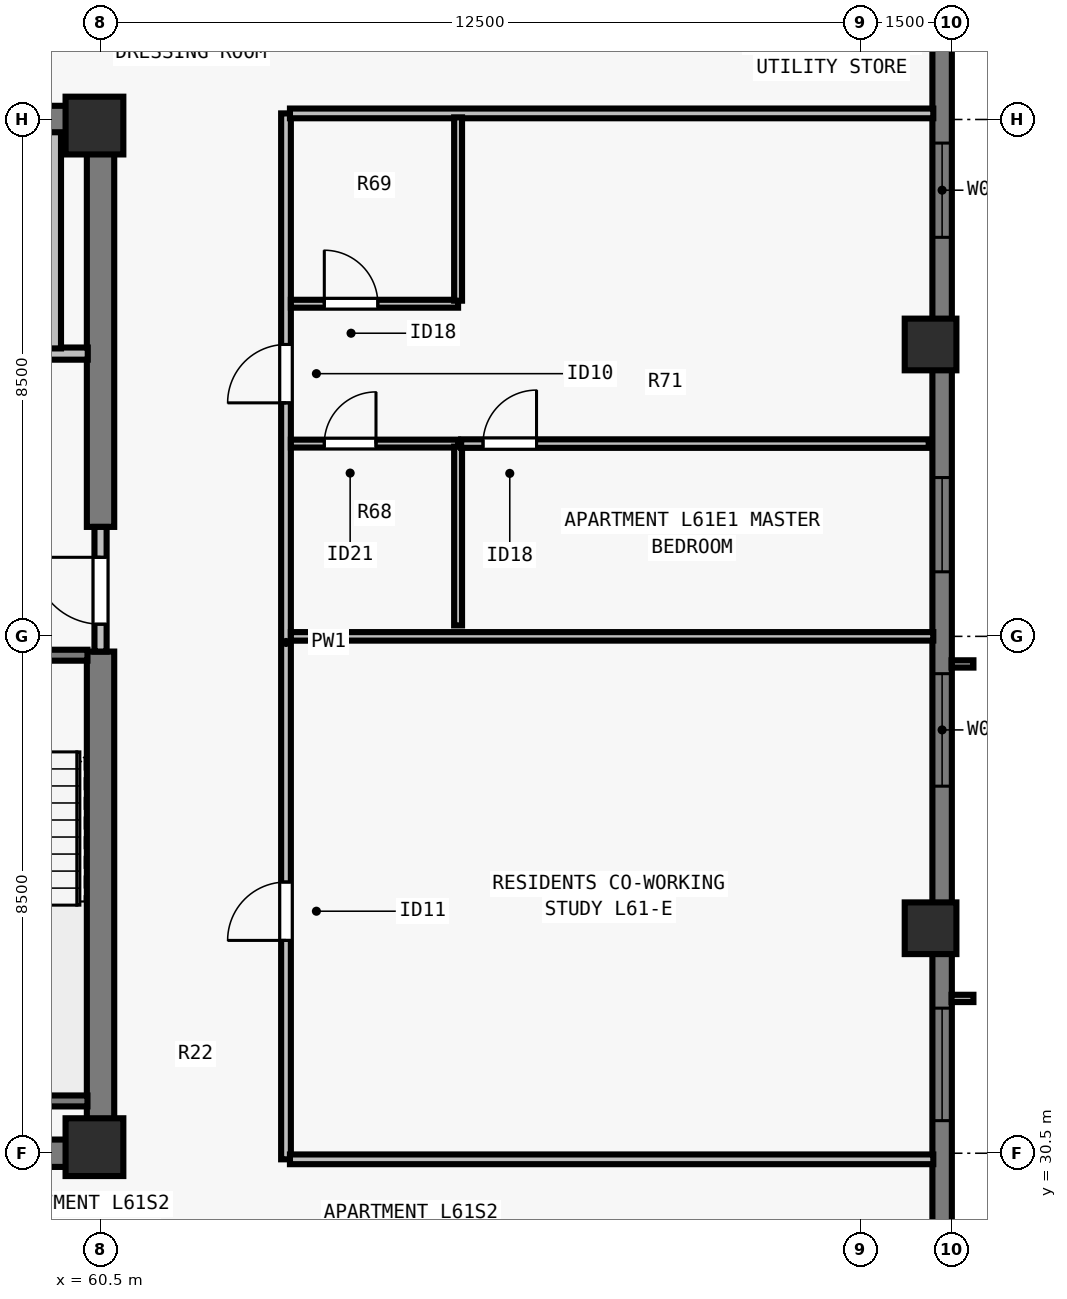
"""IFC4 building model, lengths in metres.
Left out: names, types, materials, properties, quantities, classifications, styles, units other than length and angle.
Written with IfcOpenShell. Run it as: python <this file> out.ifc"""

import sys

from ifc_helpers import new_model, si_unit, direction, frame, frame_2d, origin, origin_2d, place, context, subcontext, project, spatial, rectangle, extrude, element, fill, save


model = new_model("IFC4")
c1 = context("Model", 3, precision=1e-05, world=origin(), true_north=direction((0.0, 1.0)))
c2 = subcontext(c1, "Body", "Model", "MODEL_VIEW")
j1 = project(units=[si_unit("LENGTHUNIT", "METRE"), si_unit("PLANEANGLEUNIT", "RADIAN")], contexts=[c1])
p1 = place(None, origin())
s1 = spatial("IfcSite", under=j1, at=p1, CompositionType="ELEMENT")
p2 = place(p1, origin())
s2 = spatial("IfcBuilding", under=s1, at=p2, CompositionType="ELEMENT")
p3 = place(p2, frame((0.0, 0.0, 223.5)))
s3 = spatial("IfcBuildingStorey", under=s2, at=p3, CompositionType="ELEMENT", Elevation=223.5)
for number, where, z_axis, x_axis in (
    (1, (60.4, 30.6, 0.0), (0.0, 0.0, 1.0), (1.0, 0.0, 0.0)),
    (2, (60.4, 47.4, 0.0), (0.0, 0.0, 1.0), (1.0, 0.0, 0.0)),
):
    element("IfcColumn", number, at=place(p3, frame(where, z_axis=z_axis, x_axis=x_axis)), inside=s3, PredefinedType="COLUMN", context=c2, shape_type="SweptSolid", body=[
        extrude(rectangle(XDim=0.95, YDim=0.95, at=origin_2d()), origin(), (0.0, 0.0, 1.0), 3.5),
    ])
for number, where, z_axis, x_axis in (
    (3, (74.15, 34.2, 0.0), (0.0, 0.0, 1.0), (0.0, 1.0, 0.0)),
    (4, (74.15, 43.8, 0.0), (0.0, 0.0, 1.0), (0.0, 1.0, 0.0)),
):
    element("IfcColumn", number, at=place(p3, frame(where, z_axis=z_axis, x_axis=x_axis)), inside=s3, PredefinedType="COLUMN", context=c2, shape_type="SweptSolid", body=[
        extrude(rectangle(XDim=0.85, YDim=0.85, at=origin_2d()), origin(), (0.0, 0.0, 1.0), 3.5),
    ])
p4 = place(p3, frame((74.34, 56.5, 0.0), z_axis=(0.0, 0.0, 1.0), x_axis=(0.0, -1.0, 0.0)))
e5 = element("IfcWall", 5, at=p4, inside=s3, PredefinedType="SOLIDWALL", context=c2, shape_type="SweptSolid", body=[
    extrude(rectangle(XDim=34.702, YDim=0.32, at=frame_2d((17.351, 0.0))), origin(), (0.0, 0.0, 1.0), 3.29),
])
p5 = place(p4, frame((4.613, 0.0, 0.8)))
e6 = element("IfcOpeningElement", 6, at=p5, cuts=e5, PredefinedType="OPENING", context=c2, shape_type="SweptSolid", body=[
    extrude(rectangle(XDim=1.85, YDim=1.678, at=frame_2d((0.925, 0.839))), frame((0.0, 0.17, 0.0), z_axis=(0.0, -1.0, 0.0), x_axis=(1.0, 0.0, 0.0)), (0.0, 0.0, 1.0), 0.34),
])
p6 = place(p4, frame((9.388, 0.0, 0.8)))
e7 = element("IfcOpeningElement", 7, at=p6, cuts=e5, PredefinedType="OPENING", context=c2, shape_type="SweptSolid", body=[
    extrude(rectangle(XDim=1.55, YDim=1.678, at=frame_2d((0.775, 0.839))), frame((0.0, 0.17, 0.0), z_axis=(0.0, -1.0, 0.0), x_axis=(1.0, 0.0, 0.0)), (0.0, 0.0, 1.0), 0.34),
])
p7 = place(p4, frame((14.888, 0.0, 0.8)))
e8 = element("IfcOpeningElement", 8, at=p7, cuts=e5, PredefinedType="OPENING", context=c2, shape_type="SweptSolid", body=[
    extrude(rectangle(XDim=1.55, YDim=1.678, at=frame_2d((0.775, 0.839))), frame((0.0, 0.17, 0.0), z_axis=(0.0, -1.0, 0.0), x_axis=(1.0, 0.0, 0.0)), (0.0, 0.0, 1.0), 0.34),
])
p8 = place(p4, frame((18.114, 0.0, 0.8)))
e9 = element("IfcOpeningElement", 9, at=p8, cuts=e5, PredefinedType="OPENING", context=c2, shape_type="SweptSolid", body=[
    extrude(rectangle(XDim=1.85, YDim=1.678, at=frame_2d((0.925, 0.839))), frame((0.0, 0.17, 0.0), z_axis=(0.0, -1.0, 0.0), x_axis=(1.0, 0.0, 0.0)), (0.0, 0.0, 1.0), 0.34),
])
p9 = place(p4, frame((23.614, 0.0, 0.8)))
e10 = element("IfcOpeningElement", 10, at=p9, cuts=e5, PredefinedType="OPENING", context=c2, shape_type="SweptSolid", body=[
    extrude(rectangle(XDim=1.85, YDim=1.678, at=frame_2d((0.925, 0.839))), frame((0.0, 0.17, 0.0), z_axis=(0.0, -1.0, 0.0), x_axis=(1.0, 0.0, 0.0)), (0.0, 0.0, 1.0), 0.34),
])
p10 = place(p4, frame((28.839, 0.0, 0.8)))
e11 = element("IfcOpeningElement", 11, at=p10, cuts=e5, PredefinedType="OPENING", context=c2, shape_type="SweptSolid", body=[
    extrude(rectangle(XDim=1.55, YDim=1.678, at=frame_2d((0.775, 0.839))), frame((0.0, 0.17, 0.0), z_axis=(0.0, -1.0, 0.0), x_axis=(1.0, 0.0, 0.0)), (0.0, 0.0, 1.0), 0.34),
])
p11 = place(p4, frame((31.35, 0.0, 0.8)))
e12 = element("IfcOpeningElement", 12, at=p11, cuts=e5, PredefinedType="OPENING", context=c2, shape_type="SweptSolid", body=[
    extrude(rectangle(XDim=0.9, YDim=1.678, at=frame_2d((0.45, 0.839))), frame((0.0, 0.17, 0.0), z_axis=(0.0, -1.0, 0.0), x_axis=(1.0, 0.0, 0.0)), (0.0, 0.0, 1.0), 0.34),
])
for number, where, z_axis, x_axis in (
    (13, (43.275, 30.5, 0.0), (0.0, 0.0, 1.0), (1.0, 0.0, 0.0)),
    (14, (43.275, 47.5, 0.0), (0.0, 0.0, 1.0), (1.0, 0.0, 0.0)),
):
    element("IfcWall", number, at=place(p3, frame(where, z_axis=z_axis, x_axis=x_axis)), inside=s3, PredefinedType="SHEAR", context=c2, shape_type="SweptSolid", body=[
        extrude(rectangle(XDim=17.45, YDim=0.45, at=frame_2d((8.725, 0.0))), origin(), (0.0, 0.0, 1.0), 3.29),
    ])
p12 = place(p3, frame((60.5, 30.715, 0.0), z_axis=(0.0, 0.0, 1.0), x_axis=(0.0, 1.0, 0.0)))
e15 = element("IfcWall", 15, at=p12, inside=s3, PredefinedType="SHEAR", context=c2, shape_type="SweptSolid", body=[
    extrude(rectangle(XDim=8.035, YDim=0.45, at=frame_2d((4.018, 0.0))), origin(), (0.0, 0.0, 1.0), 3.29),
])
p13 = place(p3, frame((60.5, 40.8, 0.0), z_axis=(0.0, 0.0, 1.0), x_axis=(0.0, 1.0, 0.0)))
e16 = element("IfcWall", 16, at=p13, inside=s3, PredefinedType="SHEAR", context=c2, shape_type="SweptSolid", body=[
    extrude(rectangle(XDim=6.485, YDim=0.45, at=frame_2d((3.242, 0.0))), origin(), (0.0, 0.0, 1.0), 3.29),
])
p14 = place(p3, frame((60.5, 38.75, 0.0), z_axis=(0.0, 0.0, 1.0), x_axis=(0.0, 1.0, 0.0)))
e17 = element("IfcWall", 17, at=p14, inside=s3, PredefinedType="SOLIDWALL", context=c2, shape_type="SweptSolid", body=[
    extrude(rectangle(XDim=2.05, YDim=0.2, at=frame_2d((1.025, 0.0))), origin(), (0.0, 0.0, 1.0), 3.29),
])
p15 = place(p14, frame((0.45, 0.0, 0.0)))
e18 = element("IfcOpeningElement", 18, at=p15, cuts=e17, PredefinedType="OPENING", context=c2, shape_type="SweptSolid", body=[
    extrude(rectangle(XDim=1.1, YDim=2.15, at=frame_2d((0.55, 1.075))), frame((0.0, 0.11, 0.0), z_axis=(0.0, -1.0, 0.0), x_axis=(1.0, 0.0, 0.0)), (0.0, 0.0, 1.0), 0.22),
])
p16 = place(p3, frame((56.735, 43.65, 0.0), z_axis=(0.0, 0.0, 1.0), x_axis=(1.0, 0.0, 0.0)))
e19 = element("IfcWall", 19, at=p16, inside=s3, PredefinedType="SOLIDWALL", context=c2, shape_type="SweptSolid", body=[
    extrude(rectangle(XDim=3.555, YDim=0.2, at=frame_2d((1.777, 0.0))), origin(), (0.0, 0.0, 1.0), 3.29),
])
p17 = place(p16, frame((1.295, 0.0, 0.0)))
e20 = element("IfcOpeningElement", 20, at=p17, cuts=e19, PredefinedType="OPENING", context=c2, shape_type="SweptSolid", body=[
    extrude(rectangle(XDim=1.1, YDim=2.2, at=frame_2d((0.55, 1.1))), frame((0.0, 0.11, 0.0), z_axis=(0.0, -1.0, 0.0), x_axis=(1.0, 0.0, 0.0)), (0.0, 0.0, 1.0), 0.22),
])
p18 = place(p3, frame((59.75, 43.735, 0.0), z_axis=(0.0, 0.0, 1.0), x_axis=(0.0, 1.0, 0.0)))
e21 = element("IfcWall", 21, at=p18, inside=s3, PredefinedType="SOLIDWALL", context=c2, shape_type="SweptSolid", body=[
    extrude(rectangle(XDim=3.555, YDim=0.2, at=frame_2d((1.777, 0.0))), origin(), (0.0, 0.0, 1.0), 3.29),
])
p19 = place(p3, frame((63.55, 30.4, 0.0), z_axis=(0.0, 0.0, 1.0), x_axis=(0.0, 1.0, 0.0)))
e22 = element("IfcWall", 22, at=p19, inside=s3, PredefinedType="PARTITIONING", context=c2, shape_type="SweptSolid", body=[
    extrude(rectangle(XDim=17.2, YDim=0.16, at=frame_2d((8.6, 0.0))), origin(), (0.0, 0.0, 1.0), 3.29),
])
p20 = place(p19, frame((3.6, 0.0, 0.0)))
e23 = element("IfcOpeningElement", 23, at=p20, cuts=e22, PredefinedType="OPENING", context=c2, shape_type="SweptSolid", body=[
    extrude(rectangle(XDim=0.96, YDim=2.12, at=frame_2d((0.48, 1.06))), frame((0.0, 0.09, 0.0), z_axis=(0.0, -1.0, 0.0), x_axis=(1.0, 0.0, 0.0)), (0.0, 0.0, 1.0), 0.18),
])
p21 = place(p19, frame((12.44, 0.0, 0.0)))
e24 = element("IfcOpeningElement", 24, at=p21, cuts=e22, PredefinedType="OPENING", context=c2, shape_type="SweptSolid", body=[
    extrude(rectangle(XDim=0.96, YDim=2.18, at=frame_2d((0.48, 1.09))), frame((0.0, 0.09, 0.0), z_axis=(0.0, -1.0, 0.0), x_axis=(1.0, 0.0, 0.0)), (0.0, 0.0, 1.0), 0.18),
])
for number, where, z_axis, x_axis in (
    (25, (63.615, 30.4, 0.0), (0.0, 0.0, 1.0), (1.0, 0.0, 0.0)),
    (26, (63.615, 47.6, 0.0), (0.0, 0.0, 1.0), (1.0, 0.0, 0.0)),
):
    element("IfcWall", number, at=place(p3, frame(where, z_axis=z_axis, x_axis=x_axis)), inside=s3, PredefinedType="PARTITIONING", context=c2, shape_type="SweptSolid", body=[
        extrude(rectangle(XDim=10.58, YDim=0.16, at=frame_2d((5.29, 0.0))), origin(), (0.0, 0.0, 1.0), 3.29),
    ])
p22 = place(p3, frame((63.63, 39.0, 0.0), z_axis=(0.0, 0.0, 1.0), x_axis=(1.0, 0.0, 0.0)))
e27 = element("IfcWall", 27, at=p22, inside=s3, PredefinedType="PARTITIONING", context=c2, shape_type="SweptSolid", body=[
    extrude(rectangle(XDim=10.565, YDim=0.14, at=frame_2d((5.283, 0.0))), origin(), (0.0, 0.0, 1.0), 3.29),
])
p23 = place(p3, frame((63.63, 42.17, 0.0), z_axis=(0.0, 0.0, 1.0), x_axis=(1.0, 0.0, 0.0)))
e28 = element("IfcWall", 28, at=p23, inside=s3, PredefinedType="PLUMBINGWALL", context=c2, shape_type="SweptSolid", body=[
    extrude(rectangle(XDim=2.75, YDim=0.13, at=frame_2d((1.375, 0.0))), origin(), (0.0, 0.0, 1.0), 3.29),
])
p24 = place(p23, frame((0.55, 0.0, 0.0)))
e29 = element("IfcOpeningElement", 29, at=p24, cuts=e28, PredefinedType="OPENING", context=c2, shape_type="SweptSolid", body=[
    extrude(rectangle(XDim=0.85, YDim=2.08, at=frame_2d((0.425, 1.04))), frame((0.0, 0.075, 0.0), z_axis=(0.0, -1.0, 0.0), x_axis=(1.0, 0.0, 0.0)), (0.0, 0.0, 1.0), 0.15),
])
p25 = place(p3, frame((66.38, 39.18, 0.0), z_axis=(0.0, 0.0, 1.0), x_axis=(0.0, 1.0, 0.0)))
e30 = element("IfcWall", 30, at=p25, inside=s3, PredefinedType="PLUMBINGWALL", context=c2, shape_type="SweptSolid", body=[
    extrude(rectangle(XDim=2.94, YDim=0.13, at=frame_2d((1.47, 0.0))), origin(), (0.0, 0.0, 1.0), 3.29),
])
p26 = place(p3, frame((63.63, 44.47, 0.0), z_axis=(0.0, 0.0, 1.0), x_axis=(1.0, 0.0, 0.0)))
e31 = element("IfcWall", 31, at=p26, inside=s3, PredefinedType="PLUMBINGWALL", context=c2, shape_type="SweptSolid", body=[
    extrude(rectangle(XDim=2.75, YDim=0.13, at=frame_2d((1.375, 0.0))), origin(), (0.0, 0.0, 1.0), 3.29),
])
p27 = place(p26, frame((0.55, 0.0, 0.0)))
e32 = element("IfcOpeningElement", 32, at=p27, cuts=e31, PredefinedType="OPENING", context=c2, shape_type="SweptSolid", body=[
    extrude(rectangle(XDim=0.88, YDim=2.1, at=frame_2d((0.44, 1.05))), frame((0.0, 0.075, 0.0), z_axis=(0.0, -1.0, 0.0), x_axis=(1.0, 0.0, 0.0)), (0.0, 0.0, 1.0), 0.15),
])
p28 = place(p3, frame((66.38, 44.52, 0.0), z_axis=(0.0, 0.0, 1.0), x_axis=(0.0, 1.0, 0.0)))
e33 = element("IfcWall", 33, at=p28, inside=s3, PredefinedType="PLUMBINGWALL", context=c2, shape_type="SweptSolid", body=[
    extrude(rectangle(XDim=3.015, YDim=0.13, at=frame_2d((1.507, 0.0))), origin(), (0.0, 0.0, 1.0), 3.29),
])
p29 = place(p3, frame((66.43, 42.17, 0.0), z_axis=(0.0, 0.0, 1.0), x_axis=(1.0, 0.0, 0.0)))
e34 = element("IfcWall", 34, at=p29, inside=s3, PredefinedType="PARTITIONING", context=c2, shape_type="SweptSolid", body=[
    extrude(rectangle(XDim=7.69, YDim=0.14, at=frame_2d((3.845, 0.0))), origin(), (0.0, 0.0, 1.0), 3.29),
])
p30 = place(p29, frame((0.36, 0.0, 0.0)))
e35 = element("IfcOpeningElement", 35, at=p30, cuts=e34, PredefinedType="OPENING", context=c2, shape_type="SweptSolid", body=[
    extrude(rectangle(XDim=0.88, YDim=2.1, at=frame_2d((0.44, 1.05))), frame((0.0, 0.08, 0.0), z_axis=(0.0, -1.0, 0.0), x_axis=(1.0, 0.0, 0.0)), (0.0, 0.0, 1.0), 0.16),
])
p31 = place(p3, frame((57.005, 38.69, 0.0), z_axis=(0.0, 0.0, 1.0), x_axis=(1.0, 0.0, 0.0)))
e36 = element("IfcWall", 36, at=p31, inside=s3, PredefinedType="SOLIDWALL", context=c2, shape_type="SweptSolid", body=[
    extrude(rectangle(XDim=3.28, YDim=0.18, at=frame_2d((1.64, 0.0))), origin(), (0.0, 0.0, 1.0), 3.29),
])
p32 = place(p31, frame((1.165, 0.0, 0.0)))
e37 = element("IfcOpeningElement", 37, at=p32, cuts=e36, PredefinedType="OPENING", context=c2, shape_type="SweptSolid", body=[
    extrude(rectangle(XDim=0.95, YDim=2.15, at=frame_2d((0.475, 1.075))), frame((0.0, 0.1, 0.0), z_axis=(0.0, -1.0, 0.0), x_axis=(1.0, 0.0, 0.0)), (0.0, 0.0, 1.0), 0.2),
])
p33 = place(p3, frame((57.005, 31.36, 0.0), z_axis=(0.0, 0.0, 1.0), x_axis=(1.0, 0.0, 0.0)))
e38 = element("IfcWall", 38, at=p33, inside=s3, PredefinedType="SOLIDWALL", context=c2, shape_type="SweptSolid", body=[
    extrude(rectangle(XDim=3.28, YDim=0.18, at=frame_2d((1.64, 0.0))), origin(), (0.0, 0.0, 1.0), 3.29),
])
p34 = place(p6, origin())
e39 = element("IfcWindow", 39, at=p34, inside=s3, PartitioningType="SINGLE_PANEL", PredefinedType="WINDOW", context=c2, shape_type="SweptSolid", body=[
    extrude(rectangle(XDim=1.55, YDim=1.678, at=frame_2d((0.775, 0.839))), frame((0.0, -0.05, 0.0), z_axis=(0.0, -1.0, 0.0), x_axis=(1.0, 0.0, 0.0)), (0.0, 0.0, 1.0), 0.06),
])
fill(e7, e39)
p35 = place(p7, origin())
e40 = element("IfcWindow", 40, at=p35, inside=s3, PartitioningType="SINGLE_PANEL", PredefinedType="WINDOW", context=c2, shape_type="SweptSolid", body=[
    extrude(rectangle(XDim=1.55, YDim=1.678, at=frame_2d((0.775, 0.839))), frame((0.0, -0.05, 0.0), z_axis=(0.0, -1.0, 0.0), x_axis=(1.0, 0.0, 0.0)), (0.0, 0.0, 1.0), 0.06),
])
fill(e8, e40)
p36 = place(p8, origin())
e41 = element("IfcWindow", 41, at=p36, inside=s3, PartitioningType="SINGLE_PANEL", PredefinedType="WINDOW", context=c2, shape_type="SweptSolid", body=[
    extrude(rectangle(XDim=1.85, YDim=1.678, at=frame_2d((0.925, 0.839))), frame((0.0, -0.05, 0.0), z_axis=(0.0, -1.0, 0.0), x_axis=(1.0, 0.0, 0.0)), (0.0, 0.0, 1.0), 0.06),
])
fill(e9, e41)
p37 = place(p9, origin())
e42 = element("IfcWindow", 42, at=p37, inside=s3, PartitioningType="SINGLE_PANEL", PredefinedType="WINDOW", context=c2, shape_type="SweptSolid", body=[
    extrude(rectangle(XDim=1.85, YDim=1.678, at=frame_2d((0.925, 0.839))), frame((0.0, -0.05, 0.0), z_axis=(0.0, -1.0, 0.0), x_axis=(1.0, 0.0, 0.0)), (0.0, 0.0, 1.0), 0.06),
])
fill(e10, e42)
p38 = place(p15, origin())
e43 = element("IfcDoor", 43, at=p38, inside=s3, OperationType="SINGLE_SWING_RIGHT", PredefinedType="DOOR", context=c2, shape_type="SweptSolid", body=[
    extrude(rectangle(XDim=1.1, YDim=2.15, at=frame_2d((0.55, 1.075))), frame((0.0, 0.025, 0.0), z_axis=(0.0, -1.0, 0.0), x_axis=(1.0, 0.0, 0.0)), (0.0, 0.0, 1.0), 0.05),
])
fill(e18, e43)
p39 = place(p20, origin())
e44 = element("IfcDoor", 44, at=p39, inside=s3, OperationType="SINGLE_SWING_LEFT", PredefinedType="DOOR", context=c2, shape_type="SweptSolid", body=[
    extrude(rectangle(XDim=0.96, YDim=2.12, at=frame_2d((0.48, 1.06))), frame((0.0, 0.025, 0.0), z_axis=(0.0, -1.0, 0.0), x_axis=(1.0, 0.0, 0.0)), (0.0, 0.0, 1.0), 0.05),
])
fill(e23, e44)
p40 = place(p24, origin())
e45 = element("IfcDoor", 45, at=p40, inside=s3, OperationType="SINGLE_SWING_RIGHT", PredefinedType="DOOR", context=c2, shape_type="SweptSolid", body=[
    extrude(rectangle(XDim=0.85, YDim=2.08, at=frame_2d((0.425, 1.04))), frame((0.0, 0.025, 0.0), z_axis=(0.0, -1.0, 0.0), x_axis=(1.0, 0.0, 0.0)), (0.0, 0.0, 1.0), 0.05),
])
fill(e29, e45)
p41 = place(p27, origin())
e46 = element("IfcDoor", 46, at=p41, inside=s3, OperationType="SINGLE_SWING_LEFT", PredefinedType="DOOR", context=c2, shape_type="SweptSolid", body=[
    extrude(rectangle(XDim=0.88, YDim=2.1, at=frame_2d((0.44, 1.05))), frame((0.0, 0.025, 0.0), z_axis=(0.0, -1.0, 0.0), x_axis=(1.0, 0.0, 0.0)), (0.0, 0.0, 1.0), 0.05),
])
fill(e32, e46)
p42 = place(p30, origin())
e47 = element("IfcDoor", 47, at=p42, inside=s3, OperationType="SINGLE_SWING_RIGHT", PredefinedType="DOOR", context=c2, shape_type="SweptSolid", body=[
    extrude(rectangle(XDim=0.88, YDim=2.1, at=frame_2d((0.44, 1.05))), frame((0.0, 0.025, 0.0), z_axis=(0.0, -1.0, 0.0), x_axis=(1.0, 0.0, 0.0)), (0.0, 0.0, 1.0), 0.05),
])
fill(e35, e47)
p43 = place(p21, origin())
e48 = element("IfcDoor", 48, at=p43, inside=s3, OperationType="SINGLE_SWING_LEFT", PredefinedType="DOOR", context=c2, shape_type="SweptSolid", body=[
    extrude(rectangle(XDim=0.96, YDim=2.18, at=frame_2d((0.48, 1.09))), frame((0.0, 0.025, 0.0), z_axis=(0.0, -1.0, 0.0), x_axis=(1.0, 0.0, 0.0)), (0.0, 0.0, 1.0), 0.05),
])
fill(e24, e48)
save(model, sys.argv[1])
